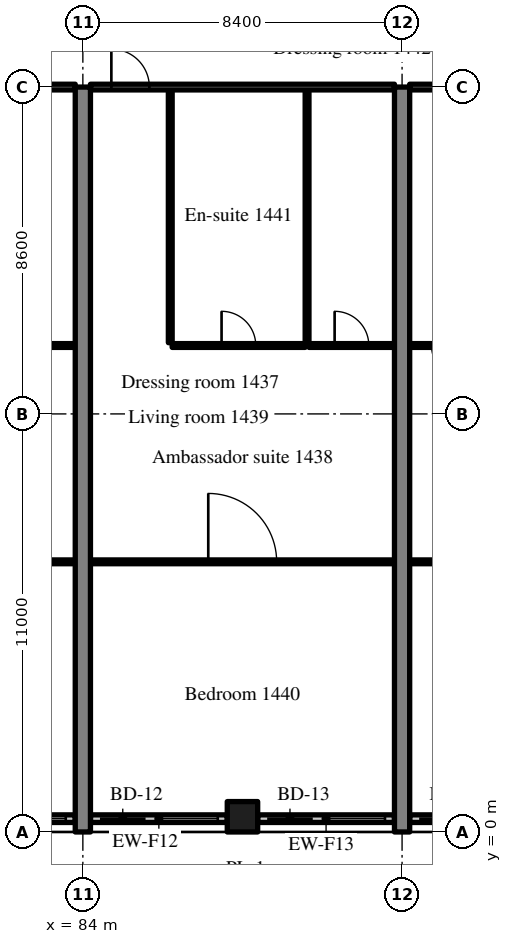
"""IFC4 building model, lengths in metres.
Left out: names, types, materials, properties, quantities, classifications, styles, units other than length and angle.
Written with IfcOpenShell. Run it as: python <this file> out.ifc"""

import sys

from ifc_helpers import new_model, si_unit, direction, frame, frame_2d, origin, origin_2d, place, context, subcontext, project, spatial, rectangle, extrude, source, transform, mapped, element, fill, save


model = new_model("IFC4")
c1 = context("Model", 3, precision=1e-05, world=origin(), true_north=direction((0.0, 1.0)))
c2 = subcontext(c1, "Body", "Model", "MODEL_VIEW")
j1 = project(units=[si_unit("LENGTHUNIT", "METRE"), si_unit("PLANEANGLEUNIT", "RADIAN")], contexts=[c1])
p1 = place(None, origin())
s1 = spatial("IfcSite", under=j1, at=p1, CompositionType="ELEMENT")
p2 = place(p1, origin())
s2 = spatial("IfcBuilding", under=s1, at=p2, CompositionType="ELEMENT")
p3 = place(p2, frame((0.0, 0.0, 62.0)))
s3 = spatial("IfcBuildingStorey", under=s2, at=p3, CompositionType="ELEMENT", Elevation=62.0)
m1 = source(origin(), c2, "Body", "SweptSolid", [
    extrude(rectangle(XDim=19.6, YDim=0.4, at=frame_2d((9.8, 0.0))), origin(), (0.0, 0.0, 1.0), 3.52),
])
for number, where, z_axis, x_axis in (
    (1, (84.0, 0.0, 0.0), (0.0, 0.0, 1.0), (0.0, 1.0, 0.0)),
    (2, (92.4, 0.0, 0.0), (0.0, 0.0, 1.0), (0.0, 1.0, 0.0)),
):
    element("IfcWall", number, at=place(p3, frame(where, z_axis=z_axis, x_axis=x_axis)), inside=s3, PredefinedType="SHEAR", context=c2, shape_type="MappedRepresentation", body=[
        mapped(m1, transform((0.0, 0.0, 0.0), scale=1.0)),
    ])
m2 = source(origin(), c2, "Body", "SweptSolid", [
    extrude(rectangle(XDim=0.8, YDim=0.8, at=origin_2d()), origin(), (0.0, 0.0, 1.0), 3.52),
])
p4 = place(p3, frame((88.2, 0.4, 0.0), z_axis=(0.0, 0.0, 1.0), x_axis=(1.0, 0.0, 0.0)))
e3 = element("IfcColumn", 3, at=p4, inside=s3, PredefinedType="COLUMN", context=c2, shape_type="MappedRepresentation", body=[
    mapped(m2, transform((0.0, 0.0, 0.0), scale=1.0)),
])
m3 = source(origin(), c2, "Body", "SweptSolid", [
    extrude(rectangle(XDim=3.6, YDim=0.2, at=frame_2d((1.8, 0.0))), origin(), (0.0, 0.0, 1.0), 2.82),
])
p5 = place(p3, frame((80.2, 0.35, 0.0), z_axis=(0.0, 0.0, 1.0), x_axis=(1.0, 0.0, 0.0)))
e4 = element("IfcWall", 4, at=p5, inside=s3, PredefinedType="SOLIDWALL", context=c2, shape_type="MappedRepresentation", body=[
    mapped(m3, transform((0.0, 0.0, 0.0), scale=1.0)),
])
m4 = source(origin(), c2, "Body", "SweptSolid", [
    extrude(rectangle(XDim=1.2, YDim=2.4, at=frame_2d((0.6, 1.2))), frame((0.0, 0.11, 0.0), z_axis=(0.0, -1.0, 0.0), x_axis=(1.0, 0.0, 0.0)), (0.0, 0.0, 1.0), 0.22),
])
p6 = place(p5, frame((0.25, 0.0, 0.0)))
e5 = element("IfcOpeningElement", 5, at=p6, cuts=e4, PredefinedType="OPENING", context=c2, shape_type="MappedRepresentation", body=[
    mapped(m4, transform((0.0, 0.0, 0.0), scale=1.0)),
])
m5 = source(origin(), c2, "Body", "SweptSolid", [
    extrude(rectangle(XDim=1.5, YDim=1.5, at=frame_2d((0.75, 0.75))), frame((0.0, 0.11, 0.0), z_axis=(0.0, -1.0, 0.0), x_axis=(1.0, 0.0, 0.0)), (0.0, 0.0, 1.0), 0.22),
])
p7 = place(p5, frame((1.85, 0.0, 0.9)))
e6 = element("IfcOpeningElement", 6, at=p7, cuts=e4, PredefinedType="OPENING", context=c2, shape_type="MappedRepresentation", body=[
    mapped(m5, transform((0.0, 0.0, 0.0), scale=1.0)),
])
p8 = place(p3, frame((84.2, 0.35, 0.0), z_axis=(0.0, 0.0, 1.0), x_axis=(1.0, 0.0, 0.0)))
e7 = element("IfcWall", 7, at=p8, inside=s3, PredefinedType="SOLIDWALL", context=c2, shape_type="MappedRepresentation", body=[
    mapped(m3, transform((0.0, 0.0, 0.0), scale=1.0)),
])
p9 = place(p8, frame((0.25, 0.0, 0.0)))
e8 = element("IfcOpeningElement", 8, at=p9, cuts=e7, PredefinedType="OPENING", context=c2, shape_type="MappedRepresentation", body=[
    mapped(m4, transform((0.0, 0.0, 0.0), scale=1.0)),
])
p10 = place(p8, frame((1.85, 0.0, 0.9)))
e9 = element("IfcOpeningElement", 9, at=p10, cuts=e7, PredefinedType="OPENING", context=c2, shape_type="MappedRepresentation", body=[
    mapped(m5, transform((0.0, 0.0, 0.0), scale=1.0)),
])
m6 = source(origin(), c2, "Body", "SweptSolid", [
    extrude(rectangle(XDim=3.6, YDim=0.2, at=frame_2d((1.8, 0.0))), origin(), (0.0, 0.0, 1.0), 2.82),
])
p11 = place(p3, frame((88.6, 0.35, 0.0), z_axis=(0.0, 0.0, 1.0), x_axis=(1.0, 0.0, 0.0)))
e10 = element("IfcWall", 10, at=p11, inside=s3, PredefinedType="SOLIDWALL", context=c2, shape_type="MappedRepresentation", body=[
    mapped(m6, transform((0.0, 0.0, 0.0), scale=1.0)),
])
p12 = place(p11, frame((0.25, 0.0, 0.0)))
e11 = element("IfcOpeningElement", 11, at=p12, cuts=e10, PredefinedType="OPENING", context=c2, shape_type="MappedRepresentation", body=[
    mapped(m4, transform((0.0, 0.0, 0.0), scale=1.0)),
])
p13 = place(p11, frame((1.85, 0.0, 0.9)))
e12 = element("IfcOpeningElement", 12, at=p13, cuts=e10, PredefinedType="OPENING", context=c2, shape_type="MappedRepresentation", body=[
    mapped(m5, transform((0.0, 0.0, 0.0), scale=1.0)),
])
m7 = source(origin(), c2, "Body", "SweptSolid", [
    extrude(rectangle(XDim=4.055, YDim=0.2, at=frame_2d((2.027, 0.0))), origin(), (0.0, 0.0, 1.0), 2.82),
])
p14 = place(p3, frame((92.6, 0.35, 0.0), z_axis=(0.0, 0.0, 1.0), x_axis=(1.0, 0.0, 0.0)))
e13 = element("IfcWall", 13, at=p14, inside=s3, PredefinedType="SOLIDWALL", context=c2, shape_type="MappedRepresentation", body=[
    mapped(m7, transform((0.0, 0.0, 0.0), scale=1.0)),
])
p15 = place(p14, frame((0.25, 0.0, 0.0)))
e14 = element("IfcOpeningElement", 14, at=p15, cuts=e13, PredefinedType="OPENING", context=c2, shape_type="MappedRepresentation", body=[
    mapped(m4, transform((0.0, 0.0, 0.0), scale=1.0)),
])
p16 = place(p14, frame((2.305, 0.0, 0.9)))
e15 = element("IfcOpeningElement", 15, at=p16, cuts=e13, PredefinedType="OPENING", context=c2, shape_type="MappedRepresentation", body=[
    mapped(m5, transform((0.0, 0.0, 0.0), scale=1.0)),
])
m8 = source(origin(), c2, "Body", "SweptSolid", [
    extrude(rectangle(XDim=2.25, YDim=0.1, at=frame_2d((1.125, 0.0))), origin(), (0.0, 0.0, 1.0), 3.52),
])
p17 = place(p3, frame((81.55, 12.8, 0.0), z_axis=(0.0, 0.0, 1.0), x_axis=(1.0, 0.0, 0.0)))
e16 = element("IfcWall", 16, at=p17, inside=s3, PredefinedType="PARTITIONING", context=c2, shape_type="MappedRepresentation", body=[
    mapped(m8, transform((0.0, 0.0, 0.0), scale=1.0)),
])
m9 = source(origin(), c2, "Body", "SweptSolid", [
    extrude(rectangle(XDim=0.9, YDim=2.1, at=frame_2d((0.45, 1.05))), frame((0.0, 0.06, 0.0), z_axis=(0.0, -1.0, 0.0), x_axis=(1.0, 0.0, 0.0)), (0.0, 0.0, 1.0), 0.12),
])
p18 = place(p17, frame((0.675, 0.0, 0.0)))
e17 = element("IfcOpeningElement", 17, at=p18, cuts=e16, PredefinedType="OPENING", context=c2, shape_type="MappedRepresentation", body=[
    mapped(m9, transform((0.0, 0.0, 0.0), scale=1.0)),
])
m10 = source(origin(), c2, "Body", "SweptSolid", [
    extrude(rectangle(XDim=8.0, YDim=0.1, at=frame_2d((4.0, 0.0))), origin(), (0.0, 0.0, 1.0), 3.52),
])
p19 = place(p3, frame((75.8, 7.108, 0.0), z_axis=(0.0, 0.0, 1.0), x_axis=(1.0, 0.0, 0.0)))
e18 = element("IfcWall", 18, at=p19, inside=s3, PredefinedType="PARTITIONING", context=c2, shape_type="MappedRepresentation", body=[
    mapped(m10, transform((0.0, 0.0, 0.0), scale=1.0)),
])
m11 = source(origin(), c2, "Body", "SweptSolid", [
    extrude(rectangle(XDim=1.8, YDim=2.1, at=frame_2d((0.9, 1.05))), frame((0.0, 0.06, 0.0), z_axis=(0.0, -1.0, 0.0), x_axis=(1.0, 0.0, 0.0)), (0.0, 0.0, 1.0), 0.12),
])
p20 = place(p19, frame((3.1, 0.0, 0.0)))
e19 = element("IfcOpeningElement", 19, at=p20, cuts=e18, PredefinedType="OPENING", context=c2, shape_type="MappedRepresentation", body=[
    mapped(m11, transform((0.0, 0.0, 0.0), scale=1.0)),
])
m12 = source(origin(), c2, "Body", "SweptSolid", [
    extrude(rectangle(XDim=8.0, YDim=0.15, at=frame_2d((4.0, 0.0))), origin(), (0.0, 0.0, 1.0), 2.82),
])
p21 = place(p3, frame((75.8, 19.6, 0.0), z_axis=(0.0, 0.0, 1.0), x_axis=(1.0, 0.0, 0.0)))
e20 = element("IfcWall", 20, at=p21, inside=s3, PredefinedType="PARTITIONING", context=c2, shape_type="MappedRepresentation", body=[
    mapped(m12, transform((0.0, 0.0, 0.0), scale=1.0)),
])
m13 = source(origin(), c2, "Body", "SweptSolid", [
    extrude(rectangle(XDim=1.0, YDim=2.1, at=frame_2d((0.5, 1.05))), frame((0.0, 0.085, 0.0), z_axis=(0.0, -1.0, 0.0), x_axis=(1.0, 0.0, 0.0)), (0.0, 0.0, 1.0), 0.17),
])
p22 = place(p21, frame((0.55, 0.0, 0.0)))
e21 = element("IfcOpeningElement", 21, at=p22, cuts=e20, PredefinedType="OPENING", context=c2, shape_type="MappedRepresentation", body=[
    mapped(m13, transform((0.0, 0.0, 0.0), scale=1.0)),
])
m14 = source(origin(), c2, "Body", "SweptSolid", [
    extrude(rectangle(XDim=6.65, YDim=0.1, at=frame_2d((3.325, 0.0))), origin(), (0.0, 0.0, 1.0), 3.52),
])
for number, where, z_axis, x_axis in (
    (22, (86.3, 12.875, 0.0), (0.0, 0.0, 1.0), (0.0, 1.0, 0.0)),
    (23, (89.9, 12.875, 0.0), (0.0, 0.0, 1.0), (0.0, 1.0, 0.0)),
):
    element("IfcWall", number, at=place(p3, frame(where, z_axis=z_axis, x_axis=x_axis)), inside=s3, PredefinedType="PARTITIONING", context=c2, shape_type="MappedRepresentation", body=[
        mapped(m14, transform((0.0, 0.0, 0.0), scale=1.0)),
    ])
m15 = source(origin(), c2, "Body", "SweptSolid", [
    extrude(rectangle(XDim=3.5, YDim=0.1, at=frame_2d((1.75, 0.0))), origin(), (0.0, 0.0, 1.0), 3.52),
])
p23 = place(p3, frame((86.35, 12.8, 0.0), z_axis=(0.0, 0.0, 1.0), x_axis=(1.0, 0.0, 0.0)))
e24 = element("IfcWall", 24, at=p23, inside=s3, PredefinedType="PARTITIONING", context=c2, shape_type="MappedRepresentation", body=[
    mapped(m15, transform((0.0, 0.0, 0.0), scale=1.0)),
])
p24 = place(p23, frame((1.3, 0.0, 0.0)))
e25 = element("IfcOpeningElement", 25, at=p24, cuts=e24, PredefinedType="OPENING", context=c2, shape_type="MappedRepresentation", body=[
    mapped(m9, transform((0.0, 0.0, 0.0), scale=1.0)),
])
p25 = place(p3, frame((89.95, 12.8, 0.0), z_axis=(0.0, 0.0, 1.0), x_axis=(1.0, 0.0, 0.0)))
e26 = element("IfcWall", 26, at=p25, inside=s3, PredefinedType="PARTITIONING", context=c2, shape_type="MappedRepresentation", body=[
    mapped(m8, transform((0.0, 0.0, 0.0), scale=1.0)),
])
p26 = place(p25, frame((0.675, 0.0, 0.0)))
e27 = element("IfcOpeningElement", 27, at=p26, cuts=e26, PredefinedType="OPENING", context=c2, shape_type="MappedRepresentation", body=[
    mapped(m9, transform((0.0, 0.0, 0.0), scale=1.0)),
])
p27 = place(p3, frame((84.2, 7.108, 0.0), z_axis=(0.0, 0.0, 1.0), x_axis=(1.0, 0.0, 0.0)))
e28 = element("IfcWall", 28, at=p27, inside=s3, PredefinedType="PARTITIONING", context=c2, shape_type="MappedRepresentation", body=[
    mapped(m10, transform((0.0, 0.0, 0.0), scale=1.0)),
])
p28 = place(p27, frame((3.1, 0.0, 0.0)))
e29 = element("IfcOpeningElement", 29, at=p28, cuts=e28, PredefinedType="OPENING", context=c2, shape_type="MappedRepresentation", body=[
    mapped(m11, transform((0.0, 0.0, 0.0), scale=1.0)),
])
p29 = place(p3, frame((84.2, 19.6, 0.0), z_axis=(0.0, 0.0, 1.0), x_axis=(1.0, 0.0, 0.0)))
e30 = element("IfcWall", 30, at=p29, inside=s3, PredefinedType="PARTITIONING", context=c2, shape_type="MappedRepresentation", body=[
    mapped(m12, transform((0.0, 0.0, 0.0), scale=1.0)),
])
p30 = place(p29, frame((0.55, 0.0, 0.0)))
e31 = element("IfcOpeningElement", 31, at=p30, cuts=e30, PredefinedType="OPENING", context=c2, shape_type="MappedRepresentation", body=[
    mapped(m13, transform((0.0, 0.0, 0.0), scale=1.0)),
])
m16 = source(origin(), c2, "Body", "SweptSolid", [
    extrude(rectangle(XDim=2.05, YDim=0.1, at=frame_2d((1.025, 0.0))), origin(), (0.0, 0.0, 1.0), 3.52),
])
p31 = place(p3, frame((92.6, 12.8, 0.0), z_axis=(0.0, 0.0, 1.0), x_axis=(1.0, 0.0, 0.0)))
e32 = element("IfcWall", 32, at=p31, inside=s3, PredefinedType="PARTITIONING", context=c2, shape_type="MappedRepresentation", body=[
    mapped(m16, transform((0.0, 0.0, 0.0), scale=1.0)),
])
p32 = place(p31, frame((0.575, 0.0, 0.0)))
e33 = element("IfcOpeningElement", 33, at=p32, cuts=e32, PredefinedType="OPENING", context=c2, shape_type="MappedRepresentation", body=[
    mapped(m9, transform((0.0, 0.0, 0.0), scale=1.0)),
])
m17 = source(origin(), c2, "Body", "SweptSolid", [
    extrude(rectangle(XDim=7.8, YDim=0.1, at=frame_2d((3.9, 0.0))), origin(), (0.0, 0.0, 1.0), 3.52),
])
p33 = place(p3, frame((92.6, 7.108, 0.0), z_axis=(0.0, 0.0, 1.0), x_axis=(1.0, 0.0, 0.0)))
e34 = element("IfcWall", 34, at=p33, inside=s3, PredefinedType="PARTITIONING", context=c2, shape_type="MappedRepresentation", body=[
    mapped(m17, transform((0.0, 0.0, 0.0), scale=1.0)),
])
p34 = place(p33, frame((3.0, 0.0, 0.0)))
e35 = element("IfcOpeningElement", 35, at=p34, cuts=e34, PredefinedType="OPENING", context=c2, shape_type="MappedRepresentation", body=[
    mapped(m11, transform((0.0, 0.0, 0.0), scale=1.0)),
])
m18 = source(origin(), c2, "Body", "SweptSolid", [
    extrude(rectangle(XDim=7.8, YDim=0.15, at=frame_2d((3.9, 0.0))), origin(), (0.0, 0.0, 1.0), 2.82),
])
p35 = place(p3, frame((92.6, 19.6, 0.0), z_axis=(0.0, 0.0, 1.0), x_axis=(1.0, 0.0, 0.0)))
e36 = element("IfcWall", 36, at=p35, inside=s3, PredefinedType="PARTITIONING", context=c2, shape_type="MappedRepresentation", body=[
    mapped(m18, transform((0.0, 0.0, 0.0), scale=1.0)),
])
p36 = place(p35, frame((6.25, 0.0, 0.0)))
e37 = element("IfcOpeningElement", 37, at=p36, cuts=e36, PredefinedType="OPENING", context=c2, shape_type="MappedRepresentation", body=[
    mapped(m13, transform((0.0, 0.0, 0.0), scale=1.0)),
])
m19 = source(origin(), c2, "Body", "SweptSolid", [
    extrude(rectangle(XDim=1.5, YDim=1.5, at=frame_2d((0.75, 0.75))), frame((0.0, 0.03, 0.0), z_axis=(0.0, -1.0, 0.0), x_axis=(1.0, 0.0, 0.0)), (0.0, 0.0, 1.0), 0.06),
])
p37 = place(p7, origin())
e38 = element("IfcWindow", 38, at=p37, inside=s3, PartitioningType="SINGLE_PANEL", PredefinedType="WINDOW", context=c2, shape_type="MappedRepresentation", body=[
    mapped(m19, transform((0.0, 0.0, 0.0), scale=1.0)),
])
fill(e6, e38)
m20 = source(origin(), c2, "Body", "SweptSolid", [
    extrude(rectangle(XDim=1.2, YDim=2.4, at=frame_2d((0.6, 1.2))), frame((0.0, 0.025, 0.0), z_axis=(0.0, -1.0, 0.0), x_axis=(1.0, 0.0, 0.0)), (0.0, 0.0, 1.0), 0.05),
])
p38 = place(p9, origin())
e39 = element("IfcDoor", 39, at=p38, inside=s3, OperationType="SLIDING_TO_RIGHT", PredefinedType="DOOR", context=c2, shape_type="MappedRepresentation", body=[
    mapped(m20, transform((0.0, 0.0, 0.0), scale=1.0)),
])
fill(e8, e39)
p39 = place(p10, origin())
e40 = element("IfcWindow", 40, at=p39, inside=s3, PartitioningType="SINGLE_PANEL", PredefinedType="WINDOW", context=c2, shape_type="MappedRepresentation", body=[
    mapped(m19, transform((0.0, 0.0, 0.0), scale=1.0)),
])
fill(e9, e40)
p40 = place(p12, origin())
e41 = element("IfcDoor", 41, at=p40, inside=s3, OperationType="SLIDING_TO_LEFT", PredefinedType="DOOR", context=c2, shape_type="MappedRepresentation", body=[
    mapped(m20, transform((0.0, 0.0, 0.0), scale=1.0)),
])
fill(e11, e41)
p41 = place(p13, origin())
e42 = element("IfcWindow", 42, at=p41, inside=s3, PartitioningType="SINGLE_PANEL", PredefinedType="WINDOW", context=c2, shape_type="MappedRepresentation", body=[
    mapped(m19, transform((0.0, 0.0, 0.0), scale=1.0)),
])
fill(e12, e42)
p42 = place(p15, origin())
e43 = element("IfcDoor", 43, at=p42, inside=s3, OperationType="SLIDING_TO_RIGHT", PredefinedType="DOOR", context=c2, shape_type="MappedRepresentation", body=[
    mapped(m20, transform((0.0, 0.0, 0.0), scale=1.0)),
])
fill(e14, e43)
m21 = source(origin(), c2, "Body", "SweptSolid", [
    extrude(rectangle(XDim=0.9, YDim=2.1, at=frame_2d((0.45, 1.05))), frame((0.0, 0.025, 0.0), z_axis=(0.0, -1.0, 0.0), x_axis=(1.0, 0.0, 0.0)), (0.0, 0.0, 1.0), 0.05),
])
p43 = place(p24, origin())
e44 = element("IfcDoor", 44, at=p43, inside=s3, OperationType="SINGLE_SWING_LEFT", PredefinedType="DOOR", context=c2, shape_type="MappedRepresentation", body=[
    mapped(m21, transform((0.0, 0.0, 0.0), scale=1.0)),
])
fill(e25, e44)
p44 = place(p26, origin())
e45 = element("IfcDoor", 45, at=p44, inside=s3, OperationType="SINGLE_SWING_LEFT", PredefinedType="DOOR", context=c2, shape_type="MappedRepresentation", body=[
    mapped(m21, transform((0.0, 0.0, 0.0), scale=1.0)),
])
fill(e27, e45)
m22 = source(origin(), c2, "Body", "SweptSolid", [
    extrude(rectangle(XDim=1.8, YDim=2.1, at=frame_2d((0.9, 1.05))), frame((0.0, 0.025, 0.0), z_axis=(0.0, -1.0, 0.0), x_axis=(1.0, 0.0, 0.0)), (0.0, 0.0, 1.0), 0.05),
])
p45 = place(p28, origin())
e46 = element("IfcDoor", 46, at=p45, inside=s3, OperationType="DOUBLE_DOOR_SINGLE_SWING", PredefinedType="DOOR", context=c2, shape_type="MappedRepresentation", body=[
    mapped(m22, transform((0.0, 0.0, 0.0), scale=1.0)),
])
fill(e29, e46)
m23 = source(origin(), c2, "Body", "SweptSolid", [
    extrude(rectangle(XDim=1.0, YDim=2.1, at=frame_2d((0.5, 1.05))), frame((0.0, 0.025, 0.0), z_axis=(0.0, -1.0, 0.0), x_axis=(1.0, 0.0, 0.0)), (0.0, 0.0, 1.0), 0.05),
])
p46 = place(p30, origin())
e47 = element("IfcDoor", 47, at=p46, inside=s3, OperationType="SINGLE_SWING_LEFT", PredefinedType="DOOR", context=c2, shape_type="MappedRepresentation", body=[
    mapped(m23, transform((0.0, 0.0, 0.0), scale=1.0)),
])
fill(e31, e47)
p47 = place(p32, origin())
e48 = element("IfcDoor", 48, at=p47, inside=s3, OperationType="SINGLE_SWING_RIGHT", PredefinedType="DOOR", context=c2, shape_type="MappedRepresentation", body=[
    mapped(m21, transform((0.0, 0.0, 0.0), scale=1.0)),
])
fill(e33, e48)
save(model, sys.argv[1])
